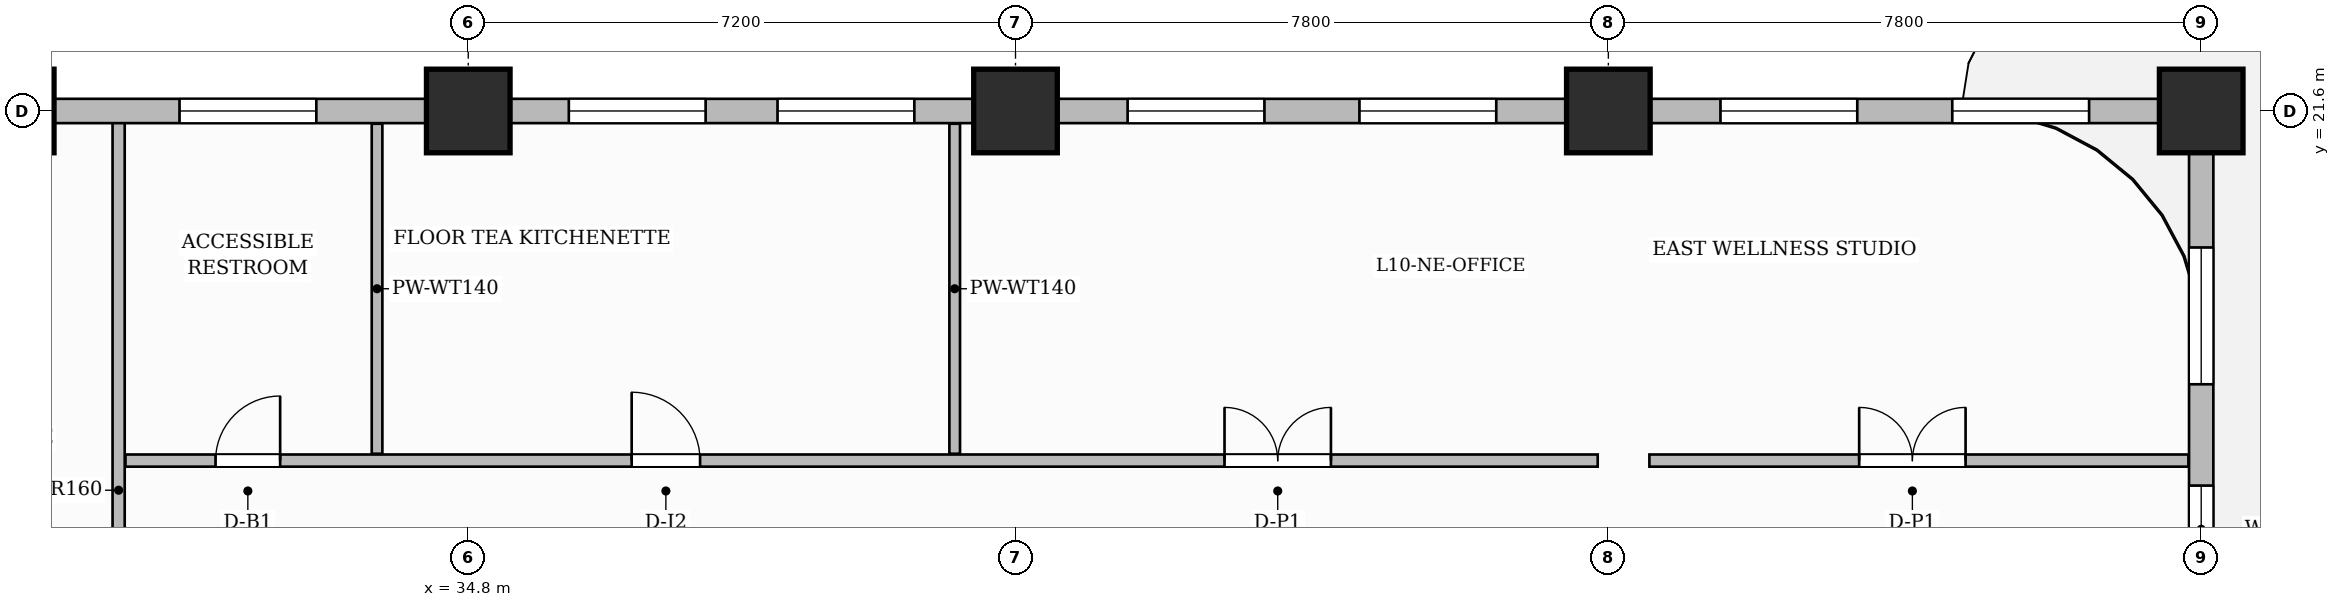
"""IFC4 building model, lengths in metres.
Left out: names, types, materials, properties, quantities, classifications, styles, units other than length and angle.
Written with IfcOpenShell. Run it as: python <this file> out.ifc"""

import sys

from ifc_helpers import new_model, si_unit, direction, frame, frame_2d, origin, origin_2d, place, context, subcontext, project, spatial, rectangle, extrude, source, transform, mapped, element, fill, save


model = new_model("IFC4")
c1 = context("Model", 3, precision=1e-05, world=origin(), true_north=direction((0.0, 1.0)))
c2 = subcontext(c1, "Body", "Model", "MODEL_VIEW")
j1 = project(units=[si_unit("LENGTHUNIT", "METRE"), si_unit("PLANEANGLEUNIT", "RADIAN")], contexts=[c1])
p1 = place(None, origin())
s1 = spatial("IfcSite", under=j1, at=p1, CompositionType="ELEMENT")
p2 = place(p1, origin())
s2 = spatial("IfcBuilding", under=s1, at=p2, CompositionType="ELEMENT")
p3 = place(p2, frame((0.0, 0.0, 47.2)))
s3 = spatial("IfcBuildingStorey", under=s2, at=p3, CompositionType="ELEMENT", Elevation=47.2)
m1 = source(origin(), c2, "Body", "SweptSolid", [
    extrude(rectangle(XDim=1.1, YDim=1.1, at=origin_2d()), origin(), (0.0, 0.0, 1.0), 3.7),
])
for number, where, z_axis, x_axis in (
    (1, (28.8, 21.6, 0.0), (0.0, 0.0, 1.0), (1.0, 0.0, 0.0)),
    (2, (34.8, 21.6, 0.0), (0.0, 0.0, 1.0), (1.0, 0.0, 0.0)),
    (3, (42.0, 21.6, 0.0), (0.0, 0.0, 1.0), (1.0, 0.0, 0.0)),
    (4, (49.8, 21.6, 0.0), (0.0, 0.0, 1.0), (1.0, 0.0, 0.0)),
    (5, (57.6, 21.6, 0.0), (0.0, 0.0, 1.0), (1.0, 0.0, 0.0)),
):
    element("IfcColumn", number, at=place(p3, frame(where, z_axis=z_axis, x_axis=x_axis)), inside=s3, PredefinedType="COLUMN", context=c2, shape_type="MappedRepresentation", body=[
        mapped(m1, transform((0.0, 0.0, 0.0), scale=1.0)),
    ])
p4 = place(p3, frame((30.2, 11.76, 0.0), z_axis=(0.0, 0.0, 1.0), x_axis=(0.0, 1.0, 0.0)))
e6 = element("IfcWall", 6, at=p4, inside=s3, PredefinedType="PARTITIONING", context=c2, shape_type="SweptSolid", body=[
    extrude(rectangle(XDim=9.7, YDim=0.16, at=frame_2d((4.85, 0.0))), origin(), (0.0, 0.0, 1.0), 3.45),
])
p5 = place(p3, frame((30.29, 17.0, 0.0), z_axis=(0.0, 0.0, 1.0), x_axis=(1.0, 0.0, 0.0)))
e7 = element("IfcWall", 7, at=p5, inside=s3, PredefinedType="PARTITIONING", context=c2, shape_type="SweptSolid", body=[
    extrude(rectangle(XDim=19.37, YDim=0.16, at=frame_2d((9.685, 0.0))), origin(), (0.0, 0.0, 1.0), 3.45),
])
p6 = place(p5, frame((1.185, 0.0, 0.0)))
e8 = element("IfcOpeningElement", 8, at=p6, cuts=e7, PredefinedType="OPENING", context=c2, shape_type="SweptSolid", body=[
    extrude(rectangle(XDim=0.85, YDim=2.1, at=frame_2d((0.425, 1.05))), frame((0.0, 0.09, 0.0), z_axis=(0.0, -1.0, 0.0), x_axis=(1.0, 0.0, 0.0)), (0.0, 0.0, 1.0), 0.18),
])
p7 = place(p5, frame((6.66, 0.0, 0.0)))
e9 = element("IfcOpeningElement", 9, at=p7, cuts=e7, PredefinedType="OPENING", context=c2, shape_type="SweptSolid", body=[
    extrude(rectangle(XDim=0.9, YDim=2.15, at=frame_2d((0.45, 1.075))), frame((0.0, 0.09, 0.0), z_axis=(0.0, -1.0, 0.0), x_axis=(1.0, 0.0, 0.0)), (0.0, 0.0, 1.0), 0.18),
])
p8 = place(p5, frame((14.46, 0.0, 0.0)))
e10 = element("IfcOpeningElement", 10, at=p8, cuts=e7, PredefinedType="OPENING", context=c2, shape_type="SweptSolid", body=[
    extrude(rectangle(XDim=1.4, YDim=2.35, at=frame_2d((0.7, 1.175))), frame((0.0, 0.09, 0.0), z_axis=(0.0, -1.0, 0.0), x_axis=(1.0, 0.0, 0.0)), (0.0, 0.0, 1.0), 0.18),
])
p9 = place(p3, frame((50.34, 17.0, 0.0), z_axis=(0.0, 0.0, 1.0), x_axis=(1.0, 0.0, 0.0)))
e11 = element("IfcWall", 11, at=p9, inside=s3, PredefinedType="PARTITIONING", context=c2, shape_type="SweptSolid", body=[
    extrude(rectangle(XDim=7.092, YDim=0.16, at=frame_2d((3.546, 0.0))), origin(), (0.0, 0.0, 1.0), 3.45),
])
p10 = place(p9, frame((2.76, 0.0, 0.0)))
e12 = element("IfcOpeningElement", 12, at=p10, cuts=e11, PredefinedType="OPENING", context=c2, shape_type="SweptSolid", body=[
    extrude(rectangle(XDim=1.4, YDim=2.35, at=frame_2d((0.7, 1.175))), frame((0.0, 0.09, 0.0), z_axis=(0.0, -1.0, 0.0), x_axis=(1.0, 0.0, 0.0)), (0.0, 0.0, 1.0), 0.18),
])
for number, where, z_axis, x_axis in (
    (13, (33.6, 17.09, 0.0), (0.0, 0.0, 1.0), (0.0, 1.0, 0.0)),
    (14, (41.2, 17.09, 0.0), (0.0, 0.0, 1.0), (0.0, 1.0, 0.0)),
):
    element("IfcWall", number, at=place(p3, frame(where, z_axis=z_axis, x_axis=x_axis)), inside=s3, PredefinedType="PARTITIONING", context=c2, shape_type="SweptSolid", body=[
        extrude(rectangle(XDim=4.342, YDim=0.14, at=frame_2d((2.171, 0.0))), origin(), (0.0, 0.0, 1.0), 3.45),
    ])
p11 = place(p3, frame((57.6, 0.05, 0.0), z_axis=(0.0, 0.0, 1.0), x_axis=(0.0, 1.0, 0.0)))
e15 = element("IfcWall", 15, at=p11, inside=s3, PredefinedType="SOLIDWALL", context=c2, shape_type="SweptSolid", body=[
    extrude(rectangle(XDim=21.5, YDim=0.32, at=frame_2d((10.75, 0.0))), origin(), (0.0, 0.0, 1.0), 2.885),
])
p12 = place(p11, frame((3.4, 0.0, 0.0)))
e16 = element("IfcOpeningElement", 16, at=p12, cuts=e15, PredefinedType="OPENING", context=c2, shape_type="SweptSolid", body=[
    extrude(rectangle(XDim=1.2, YDim=2.2, at=frame_2d((0.6, 1.1))), frame((0.0, 0.17, 0.0), z_axis=(0.0, -1.0, 0.0), x_axis=(1.0, 0.0, 0.0)), (0.0, 0.0, 1.0), 0.34),
])
p13 = place(p11, frame((1.225, 0.0, 0.8)))
e17 = element("IfcOpeningElement", 17, at=p13, cuts=e15, PredefinedType="OPENING", context=c2, shape_type="SweptSolid", body=[
    extrude(rectangle(XDim=1.4, YDim=1.85, at=frame_2d((0.7, 0.925))), frame((0.0, 0.17, 0.0), z_axis=(0.0, -1.0, 0.0), x_axis=(1.0, 0.0, 0.0)), (0.0, 0.0, 1.0), 0.34),
])
p14 = place(p11, frame((5.15, 0.0, 0.8)))
e18 = element("IfcOpeningElement", 18, at=p14, cuts=e15, PredefinedType="OPENING", context=c2, shape_type="SweptSolid", body=[
    extrude(rectangle(XDim=0.95, YDim=1.75, at=frame_2d((0.475, 0.875))), frame((0.0, 0.17, 0.0), z_axis=(0.0, -1.0, 0.0), x_axis=(1.0, 0.0, 0.0)), (0.0, 0.0, 1.0), 0.34),
])
p15 = place(p11, frame((8.475, 0.0, 0.8)))
e19 = element("IfcOpeningElement", 19, at=p15, cuts=e15, PredefinedType="OPENING", context=c2, shape_type="SweptSolid", body=[
    extrude(rectangle(XDim=1.8, YDim=1.85, at=frame_2d((0.9, 0.925))), frame((0.0, 0.17, 0.0), z_axis=(0.0, -1.0, 0.0), x_axis=(1.0, 0.0, 0.0)), (0.0, 0.0, 1.0), 0.34),
])
p16 = place(p11, frame((11.225, 0.0, 0.8)))
e20 = element("IfcOpeningElement", 20, at=p16, cuts=e15, PredefinedType="OPENING", context=c2, shape_type="SweptSolid", body=[
    extrude(rectangle(XDim=1.8, YDim=1.85, at=frame_2d((0.9, 0.925))), frame((0.0, 0.17, 0.0), z_axis=(0.0, -1.0, 0.0), x_axis=(1.0, 0.0, 0.0)), (0.0, 0.0, 1.0), 0.34),
])
p17 = place(p11, frame((15.471, 0.0, 0.8)))
e21 = element("IfcOpeningElement", 21, at=p17, cuts=e15, PredefinedType="OPENING", context=c2, shape_type="SweptSolid", body=[
    extrude(rectangle(XDim=1.15, YDim=1.8, at=frame_2d((0.575, 0.9))), frame((0.0, 0.17, 0.0), z_axis=(0.0, -1.0, 0.0), x_axis=(1.0, 0.0, 0.0)), (0.0, 0.0, 1.0), 0.34),
])
p18 = place(p11, frame((17.954, 0.0, 0.8)))
e22 = element("IfcOpeningElement", 22, at=p18, cuts=e15, PredefinedType="OPENING", context=c2, shape_type="SweptSolid", body=[
    extrude(rectangle(XDim=1.8, YDim=1.85, at=frame_2d((0.9, 0.925))), frame((0.0, 0.17, 0.0), z_axis=(0.0, -1.0, 0.0), x_axis=(1.0, 0.0, 0.0)), (0.0, 0.0, 1.0), 0.34),
])
p19 = place(p3, frame((14.4, 21.6, 0.0), z_axis=(0.0, 0.0, 1.0), x_axis=(1.0, 0.0, 0.0)))
e23 = element("IfcWall", 23, at=p19, inside=s3, PredefinedType="SOLIDWALL", context=c2, shape_type="SweptSolid", body=[
    extrude(rectangle(XDim=43.2, YDim=0.32, at=frame_2d((21.6, 0.0))), origin(), (0.0, 0.0, 1.0), 2.885),
])
p20 = place(p19, frame((1.5, 0.0, 0.0)))
e24 = element("IfcOpeningElement", 24, at=p20, cuts=e23, PredefinedType="OPENING", context=c2, shape_type="SweptSolid", body=[
    extrude(rectangle(XDim=1.2, YDim=2.2, at=frame_2d((0.6, 1.1))), frame((0.0, 0.17, 0.0), z_axis=(0.0, -1.0, 0.0), x_axis=(1.0, 0.0, 0.0)), (0.0, 0.0, 1.0), 0.34),
])
p21 = place(p19, frame((3.336, 0.0, 0.8)))
e25 = element("IfcOpeningElement", 25, at=p21, cuts=e23, PredefinedType="OPENING", context=c2, shape_type="SweptSolid", body=[
    extrude(rectangle(XDim=1.4, YDim=1.85, at=frame_2d((0.7, 0.925))), frame((0.0, 0.17, 0.0), z_axis=(0.0, -1.0, 0.0), x_axis=(1.0, 0.0, 0.0)), (0.0, 0.0, 1.0), 0.34),
])
p22 = place(p19, frame((5.269, 0.0, 0.8)))
e26 = element("IfcOpeningElement", 26, at=p22, cuts=e23, PredefinedType="OPENING", context=c2, shape_type="SweptSolid", body=[
    extrude(rectangle(XDim=0.95, YDim=1.75, at=frame_2d((0.475, 0.875))), frame((0.0, 0.17, 0.0), z_axis=(0.0, -1.0, 0.0), x_axis=(1.0, 0.0, 0.0)), (0.0, 0.0, 1.0), 0.34),
])
p23 = place(p19, frame((8.321, 0.0, 0.8)))
e27 = element("IfcOpeningElement", 27, at=p23, cuts=e23, PredefinedType="OPENING", context=c2, shape_type="SweptSolid", body=[
    extrude(rectangle(XDim=1.15, YDim=1.8, at=frame_2d((0.575, 0.9))), frame((0.0, 0.17, 0.0), z_axis=(0.0, -1.0, 0.0), x_axis=(1.0, 0.0, 0.0)), (0.0, 0.0, 1.0), 0.34),
])
p24 = place(p19, frame((10.804, 0.0, 0.8)))
e28 = element("IfcOpeningElement", 28, at=p24, cuts=e23, PredefinedType="OPENING", context=c2, shape_type="SweptSolid", body=[
    extrude(rectangle(XDim=1.8, YDim=1.85, at=frame_2d((0.9, 0.925))), frame((0.0, 0.17, 0.0), z_axis=(0.0, -1.0, 0.0), x_axis=(1.0, 0.0, 0.0)), (0.0, 0.0, 1.0), 0.34),
])
p25 = place(p19, frame((16.601, 0.0, 0.8)))
e29 = element("IfcOpeningElement", 29, at=p25, cuts=e23, PredefinedType="OPENING", context=c2, shape_type="SweptSolid", body=[
    extrude(rectangle(XDim=1.8, YDim=1.85, at=frame_2d((0.9, 0.925))), frame((0.0, 0.17, 0.0), z_axis=(0.0, -1.0, 0.0), x_axis=(1.0, 0.0, 0.0)), (0.0, 0.0, 1.0), 0.34),
])
p26 = place(p19, frame((21.723, 0.0, 0.8)))
e30 = element("IfcOpeningElement", 30, at=p26, cuts=e23, PredefinedType="OPENING", context=c2, shape_type="SweptSolid", body=[
    extrude(rectangle(XDim=1.8, YDim=1.85, at=frame_2d((0.9, 0.925))), frame((0.0, 0.17, 0.0), z_axis=(0.0, -1.0, 0.0), x_axis=(1.0, 0.0, 0.0)), (0.0, 0.0, 1.0), 0.34),
])
p27 = place(p19, frame((24.469, 0.0, 0.8)))
e31 = element("IfcOpeningElement", 31, at=p27, cuts=e23, PredefinedType="OPENING", context=c2, shape_type="SweptSolid", body=[
    extrude(rectangle(XDim=1.8, YDim=1.85, at=frame_2d((0.9, 0.925))), frame((0.0, 0.17, 0.0), z_axis=(0.0, -1.0, 0.0), x_axis=(1.0, 0.0, 0.0)), (0.0, 0.0, 1.0), 0.34),
])
p28 = place(p19, frame((29.075, 0.0, 0.8)))
e32 = element("IfcOpeningElement", 32, at=p28, cuts=e23, PredefinedType="OPENING", context=c2, shape_type="SweptSolid", body=[
    extrude(rectangle(XDim=1.8, YDim=1.85, at=frame_2d((0.9, 0.925))), frame((0.0, 0.17, 0.0), z_axis=(0.0, -1.0, 0.0), x_axis=(1.0, 0.0, 0.0)), (0.0, 0.0, 1.0), 0.34),
])
p29 = place(p19, frame((32.125, 0.0, 0.8)))
e33 = element("IfcOpeningElement", 33, at=p29, cuts=e23, PredefinedType="OPENING", context=c2, shape_type="SweptSolid", body=[
    extrude(rectangle(XDim=1.8, YDim=1.85, at=frame_2d((0.9, 0.925))), frame((0.0, 0.17, 0.0), z_axis=(0.0, -1.0, 0.0), x_axis=(1.0, 0.0, 0.0)), (0.0, 0.0, 1.0), 0.34),
])
p30 = place(p19, frame((36.875, 0.0, 0.8)))
e34 = element("IfcOpeningElement", 34, at=p30, cuts=e23, PredefinedType="OPENING", context=c2, shape_type="SweptSolid", body=[
    extrude(rectangle(XDim=1.8, YDim=1.85, at=frame_2d((0.9, 0.925))), frame((0.0, 0.17, 0.0), z_axis=(0.0, -1.0, 0.0), x_axis=(1.0, 0.0, 0.0)), (0.0, 0.0, 1.0), 0.34),
])
p31 = place(p19, frame((39.925, 0.0, 0.8)))
e35 = element("IfcOpeningElement", 35, at=p31, cuts=e23, PredefinedType="OPENING", context=c2, shape_type="SweptSolid", body=[
    extrude(rectangle(XDim=1.8, YDim=1.85, at=frame_2d((0.9, 0.925))), frame((0.0, 0.17, 0.0), z_axis=(0.0, -1.0, 0.0), x_axis=(1.0, 0.0, 0.0)), (0.0, 0.0, 1.0), 0.34),
])
m2 = source(origin(), c2, "Body", "SweptSolid", [
    extrude(rectangle(XDim=1.4, YDim=2.35, at=frame_2d((0.7, 1.175))), frame((0.0, 0.025, 0.0), z_axis=(0.0, -1.0, 0.0), x_axis=(1.0, 0.0, 0.0)), (0.0, 0.0, 1.0), 0.05),
])
p32 = place(p10, origin())
e36 = element("IfcDoor", 36, at=p32, inside=s3, OperationType="DOUBLE_DOOR_SINGLE_SWING", PredefinedType="DOOR", context=c2, shape_type="MappedRepresentation", body=[
    mapped(m2, transform((0.0, 0.0, 0.0), scale=1.0)),
])
fill(e12, e36)
m3 = source(origin(), c2, "Body", "SweptSolid", [
    extrude(rectangle(XDim=0.85, YDim=2.1, at=frame_2d((0.425, 1.05))), frame((0.0, 0.025, 0.0), z_axis=(0.0, -1.0, 0.0), x_axis=(1.0, 0.0, 0.0)), (0.0, 0.0, 1.0), 0.05),
])
p33 = place(p6, origin())
e37 = element("IfcDoor", 37, at=p33, inside=s3, OperationType="SINGLE_SWING_RIGHT", PredefinedType="DOOR", context=c2, shape_type="MappedRepresentation", body=[
    mapped(m3, transform((0.0, 0.0, 0.0), scale=1.0)),
])
fill(e8, e37)
m4 = source(origin(), c2, "Body", "SweptSolid", [
    extrude(rectangle(XDim=0.9, YDim=2.15, at=frame_2d((0.45, 1.075))), frame((0.0, 0.025, 0.0), z_axis=(0.0, -1.0, 0.0), x_axis=(1.0, 0.0, 0.0)), (0.0, 0.0, 1.0), 0.05),
])
p34 = place(p7, origin())
e38 = element("IfcDoor", 38, at=p34, inside=s3, OperationType="SINGLE_SWING_LEFT", PredefinedType="DOOR", context=c2, shape_type="MappedRepresentation", body=[
    mapped(m4, transform((0.0, 0.0, 0.0), scale=1.0)),
])
fill(e9, e38)
p35 = place(p8, origin())
e39 = element("IfcDoor", 39, at=p35, inside=s3, OperationType="DOUBLE_DOOR_SINGLE_SWING", PredefinedType="DOOR", context=c2, shape_type="MappedRepresentation", body=[
    mapped(m2, transform((0.0, 0.0, 0.0), scale=1.0)),
])
fill(e10, e39)
m5 = source(origin(), c2, "Body", "SweptSolid", [
    extrude(rectangle(XDim=1.15, YDim=1.8, at=frame_2d((0.575, 0.9))), frame((0.0, 0.03, 0.0), z_axis=(0.0, -1.0, 0.0), x_axis=(1.0, 0.0, 0.0)), (0.0, 0.0, 1.0), 0.06),
])
p36 = place(p17, origin())
e40 = element("IfcWindow", 40, at=p36, inside=s3, PartitioningType="SINGLE_PANEL", PredefinedType="WINDOW", context=c2, shape_type="MappedRepresentation", body=[
    mapped(m5, transform((0.0, 0.0, 0.0), scale=1.0)),
])
fill(e21, e40)
m6 = source(origin(), c2, "Body", "SweptSolid", [
    extrude(rectangle(XDim=1.8, YDim=1.85, at=frame_2d((0.9, 0.925))), frame((0.0, 0.03, 0.0), z_axis=(0.0, -1.0, 0.0), x_axis=(1.0, 0.0, 0.0)), (0.0, 0.0, 1.0), 0.06),
])
p37 = place(p18, origin())
e41 = element("IfcWindow", 41, at=p37, inside=s3, PartitioningType="DOUBLE_PANEL_VERTICAL", PredefinedType="WINDOW", context=c2, shape_type="MappedRepresentation", body=[
    mapped(m6, transform((0.0, 0.0, 0.0), scale=1.0)),
])
fill(e22, e41)
p38 = place(p25, origin())
e42 = element("IfcWindow", 42, at=p38, inside=s3, PartitioningType="DOUBLE_PANEL_VERTICAL", PredefinedType="WINDOW", context=c2, shape_type="MappedRepresentation", body=[
    mapped(m6, transform((0.0, 0.0, 0.0), scale=1.0)),
])
fill(e29, e42)
p39 = place(p26, origin())
e43 = element("IfcWindow", 43, at=p39, inside=s3, PartitioningType="DOUBLE_PANEL_VERTICAL", PredefinedType="WINDOW", context=c2, shape_type="MappedRepresentation", body=[
    mapped(m6, transform((0.0, 0.0, 0.0), scale=1.0)),
])
fill(e30, e43)
p40 = place(p27, origin())
e44 = element("IfcWindow", 44, at=p40, inside=s3, PartitioningType="DOUBLE_PANEL_VERTICAL", PredefinedType="WINDOW", context=c2, shape_type="MappedRepresentation", body=[
    mapped(m6, transform((0.0, 0.0, 0.0), scale=1.0)),
])
fill(e31, e44)
p41 = place(p28, origin())
e45 = element("IfcWindow", 45, at=p41, inside=s3, PartitioningType="DOUBLE_PANEL_VERTICAL", PredefinedType="WINDOW", context=c2, shape_type="MappedRepresentation", body=[
    mapped(m6, transform((0.0, 0.0, 0.0), scale=1.0)),
])
fill(e32, e45)
p42 = place(p29, origin())
e46 = element("IfcWindow", 46, at=p42, inside=s3, PartitioningType="DOUBLE_PANEL_VERTICAL", PredefinedType="WINDOW", context=c2, shape_type="MappedRepresentation", body=[
    mapped(m6, transform((0.0, 0.0, 0.0), scale=1.0)),
])
fill(e33, e46)
p43 = place(p30, origin())
e47 = element("IfcWindow", 47, at=p43, inside=s3, PartitioningType="DOUBLE_PANEL_VERTICAL", PredefinedType="WINDOW", context=c2, shape_type="MappedRepresentation", body=[
    mapped(m6, transform((0.0, 0.0, 0.0), scale=1.0)),
])
fill(e34, e47)
p44 = place(p31, origin())
e48 = element("IfcWindow", 48, at=p44, inside=s3, PartitioningType="DOUBLE_PANEL_VERTICAL", PredefinedType="WINDOW", context=c2, shape_type="MappedRepresentation", body=[
    mapped(m6, transform((0.0, 0.0, 0.0), scale=1.0)),
])
fill(e35, e48)
save(model, sys.argv[1])
